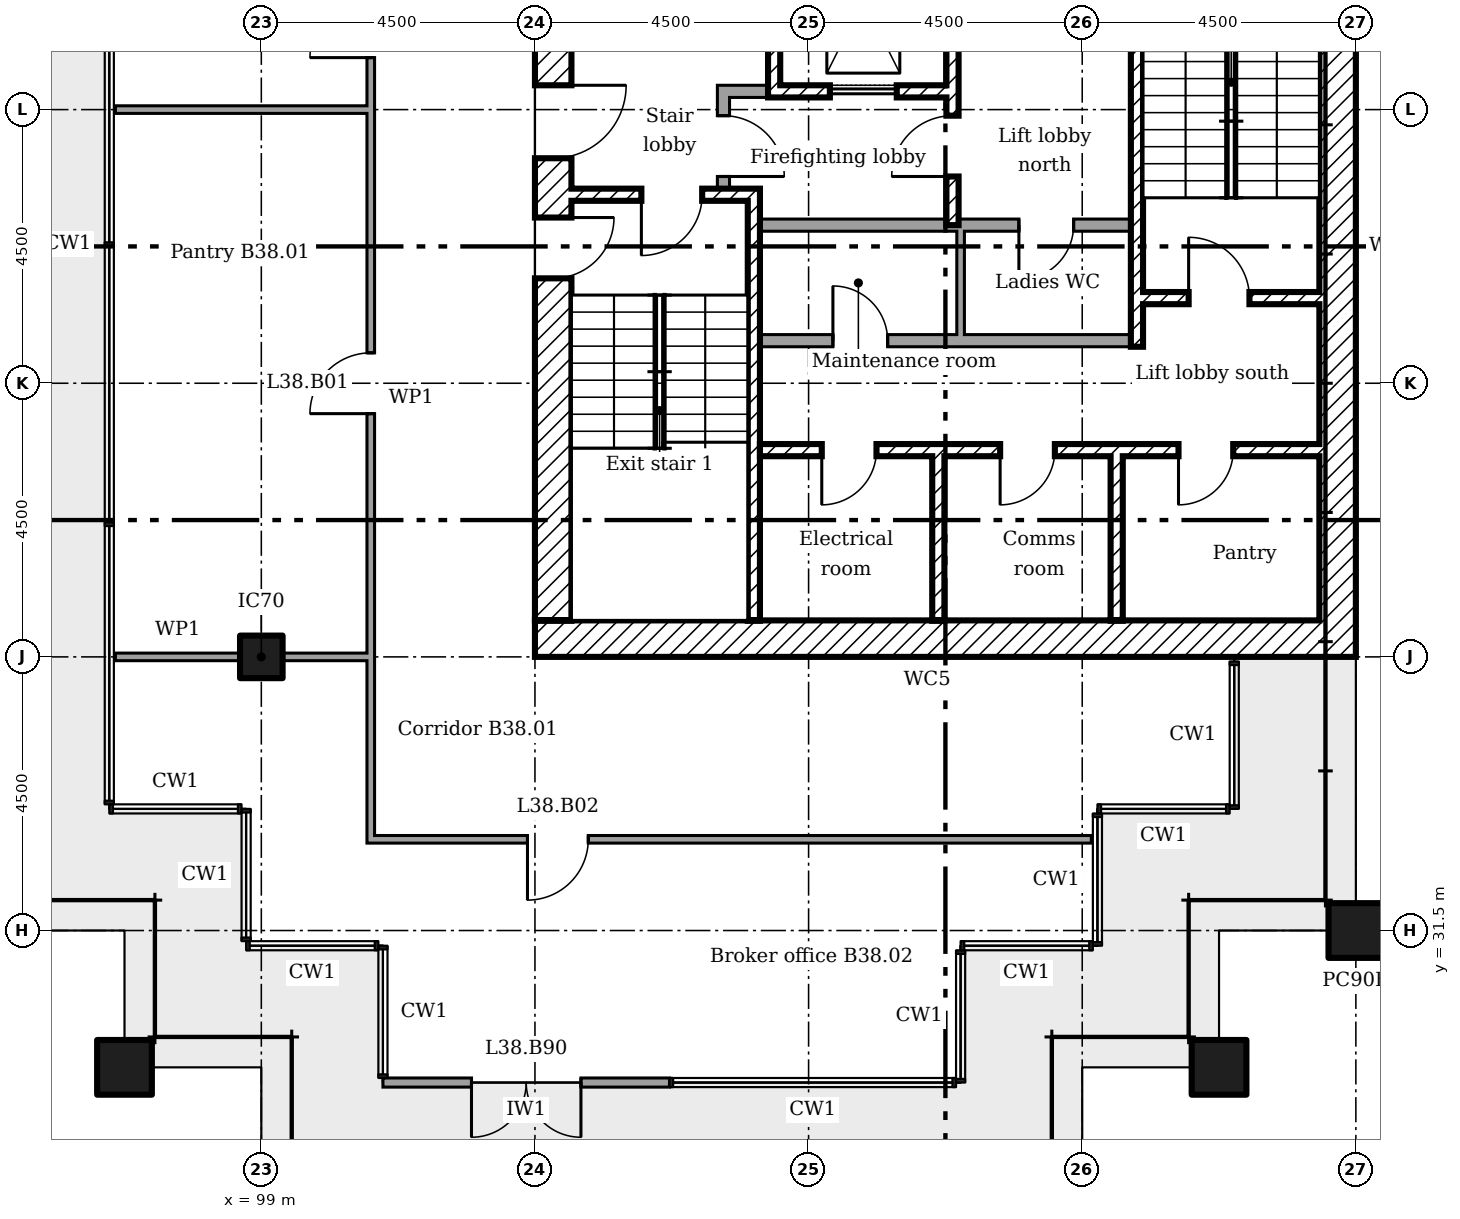
"""IFC4 building model, lengths in metres.
Left out: names, types, materials, properties, quantities, classifications, styles, units other than length and angle.
Written with IfcOpenShell. Run it as: python <this file> out.ifc"""

import sys

from ifc_helpers import new_model, si_unit, direction, frame, frame_2d, origin, origin_2d, place, context, subcontext, project, spatial, rectangle, extrude, element, fill, save


model = new_model("IFC4")
c1 = context("Model", 3, precision=1e-05, world=origin(), true_north=direction((0.0, 1.0)))
c2 = subcontext(c1, "Body", "Model", "MODEL_VIEW")
j1 = project(units=[si_unit("LENGTHUNIT", "METRE"), si_unit("PLANEANGLEUNIT", "RADIAN")], contexts=[c1])
p1 = place(None, origin())
s1 = spatial("IfcSite", under=j1, at=p1, CompositionType="ELEMENT")
p2 = place(p1, origin())
s2 = spatial("IfcBuilding", under=s1, at=p2, CompositionType="ELEMENT")
p3 = place(p2, frame((0.0, 0.0, 154.6)))
s3 = spatial("IfcBuildingStorey", under=s2, at=p3, CompositionType="ELEMENT", Elevation=154.6)
for number, where in (
    (1, (114.75, 29.25, 0.0)),
    (2, (117.0, 31.5, 0.0)),
    (3, (96.75, 29.25, 0.0)),
):
    element("IfcColumn", number, at=place(p3, frame(where)), inside=s3, PredefinedType="COLUMN", context=c2, shape_type="SweptSolid", body=[
        extrude(rectangle(XDim=0.9, YDim=0.9, at=origin_2d()), origin(), (0.0, 0.0, 1.0), 3.6),
    ])
p4 = place(p3, frame((99.0, 36.0, 0.0)))
e4 = element("IfcColumn", 4, at=p4, inside=s3, PredefinedType="COLUMN", context=c2, shape_type="SweptSolid", body=[
    extrude(rectangle(XDim=0.7, YDim=0.7, at=origin_2d()), origin(), (0.0, 0.0, 1.0), 3.6),
])
p5 = place(p3, frame((101.0, 29.0, 0.0)))
e5 = element("IfcWall", 5, at=p5, inside=s3, PredefinedType="SOLIDWALL", context=c2, shape_type="SweptSolid", body=[
    extrude(rectangle(XDim=4.712, YDim=0.15, at=frame_2d((2.356, 0.0))), origin(), (0.0, 0.0, 1.0), 3.1),
])
p6 = place(p5, frame((1.456, 0.0, 0.0)))
e6 = element("IfcOpeningElement", 6, at=p6, cuts=e5, PredefinedType="OPENING", context=c2, shape_type="SweptSolid", body=[
    extrude(rectangle(XDim=1.8, YDim=2.4, at=frame_2d((0.9, 1.2))), frame((0.0, 0.085, 0.0), z_axis=(0.0, -1.0, 0.0), x_axis=(1.0, 0.0, 0.0)), (0.0, 0.0, 1.0), 0.17),
])
p7 = place(p3, frame((116.7, 36.0, 0.0), z_axis=(0.0, 0.0, 1.0), x_axis=(0.0, 1.0, 0.0)))
e7 = element("IfcWall", 7, at=p7, inside=s3, PredefinedType="SHEAR", context=c2, shape_type="SweptSolid", body=[
    extrude(rectangle(XDim=13.5, YDim=0.6, at=frame_2d((6.75, 0.0))), origin(), (0.0, 0.0, 1.0), 3.35),
])
p8 = place(p3, frame((103.5, 36.3, 0.0)))
e8 = element("IfcWall", 8, at=p8, inside=s3, PredefinedType="SHEAR", context=c2, shape_type="SweptSolid", body=[
    extrude(rectangle(XDim=12.9, YDim=0.6, at=frame_2d((6.45, 0.0))), origin(), (0.0, 0.0, 1.0), 3.35),
])
p9 = place(p3, frame((103.8, 36.6, 0.0), z_axis=(0.0, 0.0, 1.0), x_axis=(0.0, 1.0, 0.0)))
e9 = element("IfcWall", 9, at=p9, inside=s3, PredefinedType="SHEAR", context=c2, shape_type="SweptSolid", body=[
    extrude(rectangle(XDim=12.3, YDim=0.6, at=frame_2d((6.15, 0.0))), origin(), (0.0, 0.0, 1.0), 3.35),
])
p10 = place(p9, frame((7.6, 0.0, 0.0)))
e10 = element("IfcOpeningElement", 10, at=p10, cuts=e9, PredefinedType="OPENING", context=c2, shape_type="SweptSolid", body=[
    extrude(rectangle(XDim=1.2, YDim=2.1, at=frame_2d((0.6, 1.05))), frame((0.0, 0.31, 0.0), z_axis=(0.0, -1.0, 0.0), x_axis=(1.0, 0.0, 0.0)), (0.0, 0.0, 1.0), 0.62),
])
p11 = place(p9, frame((5.625, 0.0, 0.0)))
e11 = element("IfcOpeningElement", 11, at=p11, cuts=e9, PredefinedType="OPENING", context=c2, shape_type="SweptSolid", body=[
    extrude(rectangle(XDim=1.0, YDim=2.1, at=frame_2d((0.5, 1.05))), frame((0.0, 0.31, 0.0), z_axis=(0.0, -1.0, 0.0), x_axis=(1.0, 0.0, 0.0)), (0.0, 0.0, 1.0), 0.62),
])
p12 = place(p3, frame((107.433, 48.9, 0.0), z_axis=(0.0, 0.0, 1.0), x_axis=(0.0, -1.0, 0.0)))
e12 = element("IfcWall", 12, at=p12, inside=s3, PredefinedType="SHEAR", context=c2, shape_type="SweptSolid", body=[
    extrude(rectangle(XDim=3.7, YDim=0.2, at=frame_2d((1.85, 0.0))), origin(), (0.0, 0.0, 1.0), 3.35),
])
p13 = place(p3, frame((110.367, 48.9, 0.0), z_axis=(0.0, 0.0, 1.0), x_axis=(0.0, -1.0, 0.0)))
e13 = element("IfcWall", 13, at=p13, inside=s3, PredefinedType="SHEAR", context=c2, shape_type="SweptSolid", body=[
    extrude(rectangle(XDim=5.8, YDim=0.2, at=frame_2d((2.9, 0.0))), origin(), (0.0, 0.0, 1.0), 3.35),
])
p14 = place(p13, frame((4.0, 0.0, 0.0)))
e14 = element("IfcOpeningElement", 14, at=p14, cuts=e13, PredefinedType="OPENING", context=c2, shape_type="SweptSolid", body=[
    extrude(rectangle(XDim=1.0, YDim=2.1, at=frame_2d((0.5, 1.05))), frame((0.0, 0.11, 0.0), z_axis=(0.0, -1.0, 0.0), x_axis=(1.0, 0.0, 0.0)), (0.0, 0.0, 1.0), 0.22),
])
for number, where, z_axis, x_axis in (
    (15, (110.133, 36.6, 0.0), (0.0, 0.0, 1.0), (0.0, 1.0, 0.0)),
    (16, (113.067, 36.6, 0.0), (0.0, 0.0, 1.0), (0.0, 1.0, 0.0)),
):
    element("IfcWall", number, at=place(p3, frame(where, z_axis=z_axis, x_axis=x_axis)), inside=s3, PredefinedType="SHEAR", context=c2, shape_type="SweptSolid", body=[
        extrude(rectangle(XDim=2.7, YDim=0.2, at=frame_2d((1.35, 0.0))), origin(), (0.0, 0.0, 1.0), 3.35),
    ])
p15 = place(p3, frame((106.5, 45.3, 0.0)))
e17 = element("IfcWall", 17, at=p15, inside=s3, PredefinedType="PARTITIONING", context=c2, shape_type="SweptSolid", body=[
    extrude(rectangle(XDim=0.833, YDim=0.2, at=frame_2d((0.417, 0.0))), origin(), (0.0, 0.0, 1.0), 3.35),
])
p16 = place(p3, frame((106.6, 43.7, 0.0), z_axis=(0.0, 0.0, 1.0), x_axis=(0.0, 1.0, 0.0)))
e18 = element("IfcWall", 18, at=p16, inside=s3, PredefinedType="PARTITIONING", context=c2, shape_type="SweptSolid", body=[
    extrude(rectangle(XDim=1.5, YDim=0.2, at=frame_2d((0.75, 0.0))), origin(), (0.0, 0.0, 1.0), 3.35),
])
p17 = place(p16, frame((0.2, 0.0, 0.0)))
e19 = element("IfcOpeningElement", 19, at=p17, cuts=e18, PredefinedType="OPENING", context=c2, shape_type="SweptSolid", body=[
    extrude(rectangle(XDim=1.0, YDim=2.1, at=frame_2d((0.5, 1.05))), frame((0.0, 0.11, 0.0), z_axis=(0.0, -1.0, 0.0), x_axis=(1.0, 0.0, 0.0)), (0.0, 0.0, 1.0), 0.22),
])
p18 = place(p3, frame((107.533, 45.3, 0.0)))
e20 = element("IfcWall", 20, at=p18, inside=s3, PredefinedType="SHEAR", context=c2, shape_type="SweptSolid", body=[
    extrude(rectangle(XDim=2.733, YDim=0.2, at=frame_2d((1.367, 0.0))), origin(), (0.0, 0.0, 1.0), 3.35),
])
p19 = place(p18, frame((0.817, 0.0, 0.0)))
e21 = element("IfcOpeningElement", 21, at=p19, cuts=e20, PredefinedType="OPENING", context=c2, shape_type="SweptSolid", body=[
    extrude(rectangle(XDim=1.1, YDim=2.1, at=frame_2d((0.55, 1.05))), frame((0.0, 0.11, 0.0), z_axis=(0.0, -1.0, 0.0), x_axis=(1.0, 0.0, 0.0)), (0.0, 0.0, 1.0), 0.22),
])
p20 = place(p3, frame((107.2, 39.4, 0.0)))
e22 = element("IfcWall", 22, at=p20, inside=s3, PredefinedType="SHEAR", context=c2, shape_type="SweptSolid", body=[
    extrude(rectangle(XDim=9.2, YDim=0.2, at=frame_2d((4.6, 0.0))), origin(), (0.0, 0.0, 1.0), 3.35),
])
p21 = place(p20, frame((1.017, 0.0, 0.0)))
e23 = element("IfcOpeningElement", 23, at=p21, cuts=e22, PredefinedType="OPENING", context=c2, shape_type="SweptSolid", body=[
    extrude(rectangle(XDim=0.9, YDim=2.1, at=frame_2d((0.45, 1.05))), frame((0.0, 0.11, 0.0), z_axis=(0.0, -1.0, 0.0), x_axis=(1.0, 0.0, 0.0)), (0.0, 0.0, 1.0), 0.22),
])
p22 = place(p20, frame((3.95, 0.0, 0.0)))
e24 = element("IfcOpeningElement", 24, at=p22, cuts=e22, PredefinedType="OPENING", context=c2, shape_type="SweptSolid", body=[
    extrude(rectangle(XDim=0.9, YDim=2.1, at=frame_2d((0.45, 1.05))), frame((0.0, 0.11, 0.0), z_axis=(0.0, -1.0, 0.0), x_axis=(1.0, 0.0, 0.0)), (0.0, 0.0, 1.0), 0.22),
])
p23 = place(p20, frame((6.883, 0.0, 0.0)))
e25 = element("IfcOpeningElement", 25, at=p23, cuts=e22, PredefinedType="OPENING", context=c2, shape_type="SweptSolid", body=[
    extrude(rectangle(XDim=0.9, YDim=2.1, at=frame_2d((0.45, 1.05))), frame((0.0, 0.11, 0.0), z_axis=(0.0, -1.0, 0.0), x_axis=(1.0, 0.0, 0.0)), (0.0, 0.0, 1.0), 0.22),
])
p24 = place(p3, frame((107.1, 36.6, 0.0), z_axis=(0.0, 0.0, 1.0), x_axis=(0.0, 1.0, 0.0)))
e26 = element("IfcWall", 26, at=p24, inside=s3, PredefinedType="SHEAR", context=c2, shape_type="SweptSolid", body=[
    extrude(rectangle(XDim=7.1, YDim=0.2, at=frame_2d((3.55, 0.0))), origin(), (0.0, 0.0, 1.0), 3.35),
])
p25 = place(p3, frame((104.1, 43.6, 0.0)))
e27 = element("IfcWall", 27, at=p25, inside=s3, PredefinedType="SHEAR", context=c2, shape_type="SweptSolid", body=[
    extrude(rectangle(XDim=2.9, YDim=0.2, at=frame_2d((1.45, 0.0))), origin(), (0.0, 0.0, 1.0), 3.35),
])
p26 = place(p25, frame((1.15, 0.0, 0.0)))
e28 = element("IfcOpeningElement", 28, at=p26, cuts=e27, PredefinedType="OPENING", context=c2, shape_type="SweptSolid", body=[
    extrude(rectangle(XDim=1.0, YDim=2.1, at=frame_2d((0.5, 1.05))), frame((0.0, 0.11, 0.0), z_axis=(0.0, -1.0, 0.0), x_axis=(1.0, 0.0, 0.0)), (0.0, 0.0, 1.0), 0.22),
])
p27 = place(p3, frame((113.5, 41.9, 0.0)))
e29 = element("IfcWall", 29, at=p27, inside=s3, PredefinedType="SHEAR", context=c2, shape_type="SweptSolid", body=[
    extrude(rectangle(XDim=2.9, YDim=0.2, at=frame_2d((1.45, 0.0))), origin(), (0.0, 0.0, 1.0), 3.35),
])
p28 = place(p27, frame((0.75, 0.0, 0.0)))
e30 = element("IfcOpeningElement", 30, at=p28, cuts=e29, PredefinedType="OPENING", context=c2, shape_type="SweptSolid", body=[
    extrude(rectangle(XDim=1.0, YDim=2.1, at=frame_2d((0.5, 1.05))), frame((0.0, 0.11, 0.0), z_axis=(0.0, -1.0, 0.0), x_axis=(1.0, 0.0, 0.0)), (0.0, 0.0, 1.0), 0.22),
])
p29 = place(p3, frame((113.4, 41.1, 0.0), z_axis=(0.0, 0.0, 1.0), x_axis=(0.0, 1.0, 0.0)))
e31 = element("IfcWall", 31, at=p29, inside=s3, PredefinedType="SHEAR", context=c2, shape_type="SweptSolid", body=[
    extrude(rectangle(XDim=7.8, YDim=0.2, at=frame_2d((3.9, 0.0))), origin(), (0.0, 0.0, 1.0), 3.35),
])
p30 = place(p3, frame((107.2, 43.1, 0.0)))
e32 = element("IfcWall", 32, at=p30, inside=s3, PredefinedType="PARTITIONING", context=c2, shape_type="SweptSolid", body=[
    extrude(rectangle(XDim=6.1, YDim=0.2, at=frame_2d((3.05, 0.0))), origin(), (0.0, 0.0, 1.0), 3.35),
])
p31 = place(p30, frame((4.259, 0.0, 0.0)))
e33 = element("IfcOpeningElement", 33, at=p31, cuts=e32, PredefinedType="OPENING", context=c2, shape_type="SweptSolid", body=[
    extrude(rectangle(XDim=0.9, YDim=2.1, at=frame_2d((0.45, 1.05))), frame((0.0, 0.11, 0.0), z_axis=(0.0, -1.0, 0.0), x_axis=(1.0, 0.0, 0.0)), (0.0, 0.0, 1.0), 0.22),
])
p32 = place(p3, frame((107.2, 41.2, 0.0)))
e34 = element("IfcWall", 34, at=p32, inside=s3, PredefinedType="PARTITIONING", context=c2, shape_type="SweptSolid", body=[
    extrude(rectangle(XDim=6.1, YDim=0.2, at=frame_2d((3.05, 0.0))), origin(), (0.0, 0.0, 1.0), 3.35),
])
p33 = place(p32, frame((1.2, 0.0, 0.0)))
e35 = element("IfcOpeningElement", 35, at=p33, cuts=e34, PredefinedType="OPENING", context=c2, shape_type="SweptSolid", body=[
    extrude(rectangle(XDim=0.9, YDim=2.1, at=frame_2d((0.45, 1.05))), frame((0.0, 0.11, 0.0), z_axis=(0.0, -1.0, 0.0), x_axis=(1.0, 0.0, 0.0)), (0.0, 0.0, 1.0), 0.22),
])
p34 = place(p3, frame((110.5, 41.3, 0.0), z_axis=(0.0, 0.0, 1.0), x_axis=(0.0, 1.0, 0.0)))
e36 = element("IfcWall", 36, at=p34, inside=s3, PredefinedType="PARTITIONING", context=c2, shape_type="SweptSolid", body=[
    extrude(rectangle(XDim=1.7, YDim=0.125, at=frame_2d((0.85, 0.0))), origin(), (0.0, 0.0, 1.0), 3.35),
])
p35 = place(p3, frame((100.738, 33.0, 0.0)))
e37 = element("IfcWall", 37, at=p35, inside=s3, PredefinedType="PARTITIONING", context=c2, shape_type="SweptSolid", body=[
    extrude(rectangle(XDim=11.912, YDim=0.125, at=frame_2d((5.956, 0.0))), origin(), (0.0, 0.0, 1.0), 3.45),
])
p36 = place(p35, frame((2.639, 0.0, 0.0)))
e38 = element("IfcOpeningElement", 38, at=p36, cuts=e37, PredefinedType="OPENING", context=c2, shape_type="SweptSolid", body=[
    extrude(rectangle(XDim=1.0, YDim=2.1, at=frame_2d((0.5, 1.05))), frame((0.0, 0.073, 0.0), z_axis=(0.0, -1.0, 0.0), x_axis=(1.0, 0.0, 0.0)), (0.0, 0.0, 1.0), 0.145),
])
p37 = place(p3, frame((96.6, 36.0, 0.0)))
e39 = element("IfcWall", 39, at=p37, inside=s3, PredefinedType="PARTITIONING", context=c2, shape_type="SweptSolid", body=[
    extrude(rectangle(XDim=2.05, YDim=0.125, at=frame_2d((1.025, 0.0))), origin(), (0.0, 0.0, 1.0), 2.842),
])
p38 = place(p3, frame((99.35, 36.0, 0.0)))
e40 = element("IfcWall", 40, at=p38, inside=s3, PredefinedType="PARTITIONING", context=c2, shape_type="SweptSolid", body=[
    extrude(rectangle(XDim=1.45, YDim=0.125, at=frame_2d((0.725, 0.0))), origin(), (0.0, 0.0, 1.0), 2.842),
])
p39 = place(p3, frame((96.6, 45.0, 0.0)))
e41 = element("IfcWall", 41, at=p39, inside=s3, PredefinedType="PARTITIONING", context=c2, shape_type="SweptSolid", body=[
    extrude(rectangle(XDim=4.2, YDim=0.125, at=frame_2d((2.1, 0.0))), origin(), (0.0, 0.0, 1.0), 2.851),
])
p40 = place(p3, frame((100.8, 33.062, 0.0), z_axis=(0.0, 0.0, 1.0), x_axis=(0.0, 1.0, 0.0)))
e42 = element("IfcWall", 42, at=p40, inside=s3, PredefinedType="PARTITIONING", context=c2, shape_type="SweptSolid", body=[
    extrude(rectangle(XDim=14.375, YDim=0.125, at=frame_2d((7.188, 0.0))), origin(), (0.0, 0.0, 1.0), 3.45),
])
p41 = place(p40, frame((6.938, 0.0, 0.0)))
e43 = element("IfcOpeningElement", 43, at=p41, cuts=e42, PredefinedType="OPENING", context=c2, shape_type="SweptSolid", body=[
    extrude(rectangle(XDim=1.0, YDim=2.1, at=frame_2d((0.5, 1.05))), frame((0.0, 0.073, 0.0), z_axis=(0.0, -1.0, 0.0), x_axis=(1.0, 0.0, 0.0)), (0.0, 0.0, 1.0), 0.145),
])
p42 = place(p40, frame((12.792, 0.0, 0.0)))
e44 = element("IfcOpeningElement", 44, at=p42, cuts=e42, PredefinedType="OPENING", context=c2, shape_type="SweptSolid", body=[
    extrude(rectangle(XDim=1.0, YDim=2.1, at=frame_2d((0.5, 1.05))), frame((0.0, 0.073, 0.0), z_axis=(0.0, -1.0, 0.0), x_axis=(1.0, 0.0, 0.0)), (0.0, 0.0, 1.0), 0.145),
])
p43 = place(p6, frame((1.8, 0.0, 0.0), x_axis=(-1.0, 0.0, 0.0)))
e45 = element("IfcDoor", 45, at=p43, inside=s3, OperationType="DOUBLE_DOOR_DOUBLE_SWING", PredefinedType="NOTDEFINED", context=c2, shape_type="SweptSolid", body=[
    extrude(rectangle(XDim=1.8, YDim=2.4, at=frame_2d((0.9, 1.2))), frame((0.0, 0.025, 0.0), z_axis=(0.0, -1.0, 0.0), x_axis=(1.0, 0.0, 0.0)), (0.0, 0.0, 1.0), 0.05),
])
fill(e6, e45)
p44 = place(p10, frame((1.2, 0.0, 0.0), x_axis=(-1.0, 0.0, 0.0)))
e46 = element("IfcDoor", 46, at=p44, inside=s3, OperationType="SINGLE_SWING_RIGHT", PredefinedType="DOOR", context=c2, shape_type="SweptSolid", body=[
    extrude(rectangle(XDim=1.2, YDim=2.1, at=frame_2d((0.6, 1.05))), frame((0.0, 0.025, 0.0), z_axis=(0.0, -1.0, 0.0), x_axis=(1.0, 0.0, 0.0)), (0.0, 0.0, 1.0), 0.05),
])
fill(e10, e46)
p45 = place(p26, frame((1.0, 0.0, 0.0), x_axis=(-1.0, 0.0, 0.0)))
e47 = element("IfcDoor", 47, at=p45, inside=s3, OperationType="SINGLE_SWING_LEFT", PredefinedType="DOOR", context=c2, shape_type="SweptSolid", body=[
    extrude(rectangle(XDim=1.0, YDim=2.1, at=frame_2d((0.5, 1.05))), frame((0.0, 0.025, 0.0), z_axis=(0.0, -1.0, 0.0), x_axis=(1.0, 0.0, 0.0)), (0.0, 0.0, 1.0), 0.05),
])
fill(e28, e47)
p46 = place(p11, frame((1.0, 0.0, 0.0), x_axis=(-1.0, 0.0, 0.0)))
e48 = element("IfcDoor", 48, at=p46, inside=s3, OperationType="SINGLE_SWING_RIGHT", PredefinedType="DOOR", context=c2, shape_type="SweptSolid", body=[
    extrude(rectangle(XDim=1.0, YDim=2.1, at=frame_2d((0.5, 1.05))), frame((0.0, 0.025, 0.0), z_axis=(0.0, -1.0, 0.0), x_axis=(1.0, 0.0, 0.0)), (0.0, 0.0, 1.0), 0.05),
])
fill(e11, e48)
p47 = place(p28, origin())
e49 = element("IfcDoor", 49, at=p47, inside=s3, OperationType="SINGLE_SWING_RIGHT", PredefinedType="DOOR", context=c2, shape_type="SweptSolid", body=[
    extrude(rectangle(XDim=1.0, YDim=2.1, at=frame_2d((0.5, 1.05))), frame((0.0, 0.025, 0.0), z_axis=(0.0, -1.0, 0.0), x_axis=(1.0, 0.0, 0.0)), (0.0, 0.0, 1.0), 0.05),
])
fill(e30, e49)
p48 = place(p14, frame((1.0, 0.0, 0.0), x_axis=(-1.0, 0.0, 0.0)))
e50 = element("IfcDoor", 50, at=p48, inside=s3, OperationType="SINGLE_SWING_RIGHT", PredefinedType="DOOR", context=c2, shape_type="SweptSolid", body=[
    extrude(rectangle(XDim=1.0, YDim=2.1, at=frame_2d((0.5, 1.05))), frame((0.0, 0.025, 0.0), z_axis=(0.0, -1.0, 0.0), x_axis=(1.0, 0.0, 0.0)), (0.0, 0.0, 1.0), 0.05),
])
fill(e14, e50)
p49 = place(p17, frame((1.0, 0.0, 0.0), x_axis=(-1.0, 0.0, 0.0)))
e51 = element("IfcDoor", 51, at=p49, inside=s3, OperationType="SINGLE_SWING_LEFT", PredefinedType="DOOR", context=c2, shape_type="SweptSolid", body=[
    extrude(rectangle(XDim=1.0, YDim=2.1, at=frame_2d((0.5, 1.05))), frame((0.0, 0.025, 0.0), z_axis=(0.0, -1.0, 0.0), x_axis=(1.0, 0.0, 0.0)), (0.0, 0.0, 1.0), 0.05),
])
fill(e19, e51)
p50 = place(p21, frame((0.9, 0.0, 0.0), x_axis=(-1.0, 0.0, 0.0)))
e52 = element("IfcDoor", 52, at=p50, inside=s3, OperationType="SINGLE_SWING_LEFT", PredefinedType="DOOR", context=c2, shape_type="SweptSolid", body=[
    extrude(rectangle(XDim=0.9, YDim=2.1, at=frame_2d((0.45, 1.05))), frame((0.0, 0.025, 0.0), z_axis=(0.0, -1.0, 0.0), x_axis=(1.0, 0.0, 0.0)), (0.0, 0.0, 1.0), 0.05),
])
fill(e23, e52)
p51 = place(p22, frame((0.9, 0.0, 0.0), x_axis=(-1.0, 0.0, 0.0)))
e53 = element("IfcDoor", 53, at=p51, inside=s3, OperationType="SINGLE_SWING_LEFT", PredefinedType="DOOR", context=c2, shape_type="SweptSolid", body=[
    extrude(rectangle(XDim=0.9, YDim=2.1, at=frame_2d((0.45, 1.05))), frame((0.0, 0.025, 0.0), z_axis=(0.0, -1.0, 0.0), x_axis=(1.0, 0.0, 0.0)), (0.0, 0.0, 1.0), 0.05),
])
fill(e24, e53)
p52 = place(p23, frame((0.9, 0.0, 0.0), x_axis=(-1.0, 0.0, 0.0)))
e54 = element("IfcDoor", 54, at=p52, inside=s3, OperationType="SINGLE_SWING_LEFT", PredefinedType="DOOR", context=c2, shape_type="SweptSolid", body=[
    extrude(rectangle(XDim=0.9, YDim=2.1, at=frame_2d((0.45, 1.05))), frame((0.0, 0.025, 0.0), z_axis=(0.0, -1.0, 0.0), x_axis=(1.0, 0.0, 0.0)), (0.0, 0.0, 1.0), 0.05),
])
fill(e25, e54)
p53 = place(p33, origin())
e55 = element("IfcDoor", 55, at=p53, inside=s3, OperationType="SINGLE_SWING_RIGHT", PredefinedType="DOOR", context=c2, shape_type="SweptSolid", body=[
    extrude(rectangle(XDim=0.9, YDim=2.1, at=frame_2d((0.45, 1.05))), frame((0.0, 0.025, 0.0), z_axis=(0.0, -1.0, 0.0), x_axis=(1.0, 0.0, 0.0)), (0.0, 0.0, 1.0), 0.05),
])
fill(e35, e55)
p54 = place(p31, frame((0.9, 0.0, 0.0), x_axis=(-1.0, 0.0, 0.0)))
e56 = element("IfcDoor", 56, at=p54, inside=s3, OperationType="SINGLE_SWING_LEFT", PredefinedType="DOOR", context=c2, shape_type="SweptSolid", body=[
    extrude(rectangle(XDim=0.9, YDim=2.1, at=frame_2d((0.45, 1.05))), frame((0.0, 0.025, 0.0), z_axis=(0.0, -1.0, 0.0), x_axis=(1.0, 0.0, 0.0)), (0.0, 0.0, 1.0), 0.05),
])
fill(e33, e56)
p55 = place(p19, origin())
e57 = element("IfcDoor", 57, at=p55, inside=s3, OperationType="SLIDING_TO_LEFT", PredefinedType="DOOR", context=c2, shape_type="SweptSolid", body=[
    extrude(rectangle(XDim=1.1, YDim=2.1, at=frame_2d((0.55, 1.05))), frame((0.0, 0.025, 0.0), z_axis=(0.0, -1.0, 0.0), x_axis=(1.0, 0.0, 0.0)), (0.0, 0.0, 1.0), 0.05),
])
fill(e21, e57)
p56 = place(p41, origin())
e58 = element("IfcDoor", 58, at=p56, inside=s3, OperationType="SINGLE_SWING_RIGHT", PredefinedType="DOOR", context=c2, shape_type="SweptSolid", body=[
    extrude(rectangle(XDim=1.0, YDim=2.1, at=frame_2d((0.5, 1.05))), frame((0.0, 0.025, 0.0), z_axis=(0.0, -1.0, 0.0), x_axis=(1.0, 0.0, 0.0)), (0.0, 0.0, 1.0), 0.05),
])
fill(e43, e58)
p57 = place(p36, frame((1.0, 0.0, 0.0), x_axis=(-1.0, 0.0, 0.0)))
e59 = element("IfcDoor", 59, at=p57, inside=s3, OperationType="SINGLE_SWING_LEFT", PredefinedType="DOOR", context=c2, shape_type="SweptSolid", body=[
    extrude(rectangle(XDim=1.0, YDim=2.1, at=frame_2d((0.5, 1.05))), frame((0.0, 0.025, 0.0), z_axis=(0.0, -1.0, 0.0), x_axis=(1.0, 0.0, 0.0)), (0.0, 0.0, 1.0), 0.05),
])
fill(e38, e59)
p58 = place(p42, origin())
e60 = element("IfcDoor", 60, at=p58, inside=s3, OperationType="SINGLE_SWING_RIGHT", PredefinedType="DOOR", context=c2, shape_type="SweptSolid", body=[
    extrude(rectangle(XDim=1.0, YDim=2.1, at=frame_2d((0.5, 1.05))), frame((0.0, 0.025, 0.0), z_axis=(0.0, -1.0, 0.0), x_axis=(1.0, 0.0, 0.0)), (0.0, 0.0, 1.0), 0.05),
])
fill(e44, e60)
save(model, sys.argv[1])
